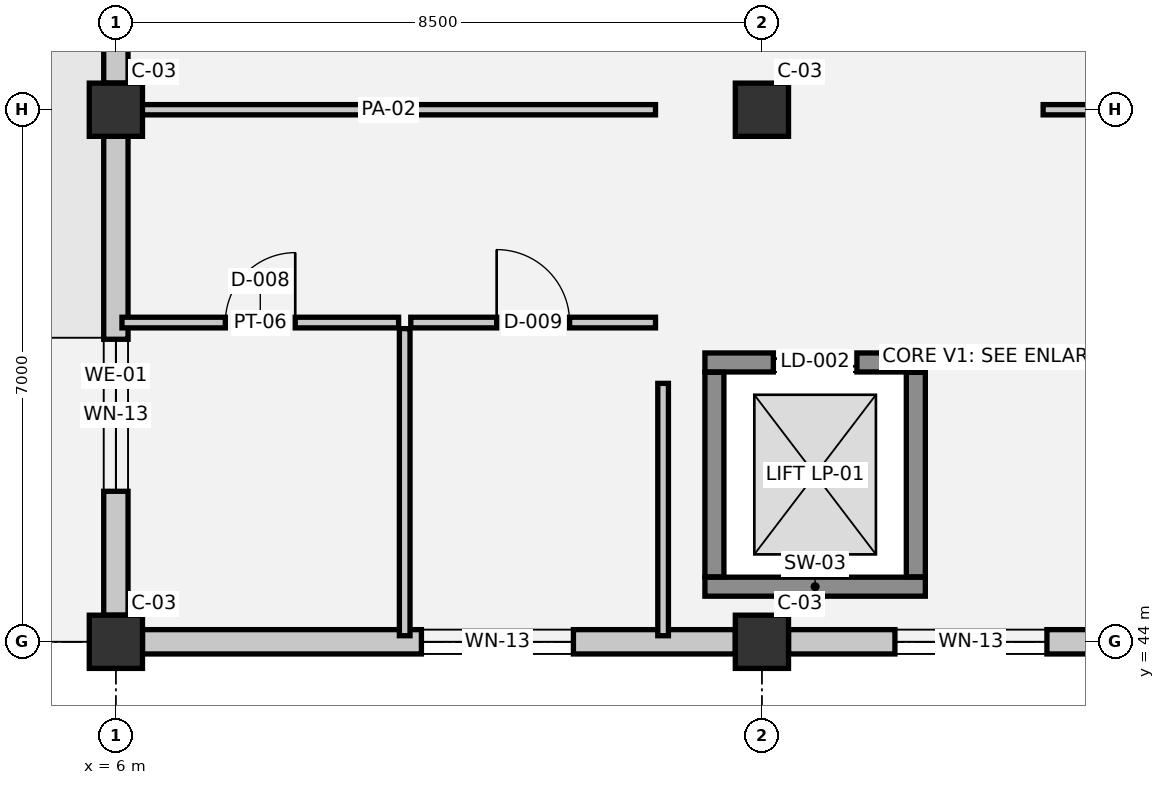
"""IFC4 building model, lengths in metres.
Left out: names, types, materials, properties, quantities, classifications, styles, units other than length and angle.
Written with IfcOpenShell. Run it as: python <this file> out.ifc"""

import sys

from ifc_helpers import new_model, si_unit, direction, frame, frame_2d, origin, origin_2d, place, context, subcontext, project, spatial, rectangle, extrude, element, fill, save


model = new_model("IFC4")
c1 = context("Model", 3, precision=1e-05, world=origin(), true_north=direction((0.0, 1.0)))
c2 = subcontext(c1, "Body", "Model", "MODEL_VIEW")
j1 = project(units=[si_unit("LENGTHUNIT", "METRE"), si_unit("PLANEANGLEUNIT", "RADIAN")], contexts=[c1])
p1 = place(None, origin())
s1 = spatial("IfcSite", under=j1, at=p1, CompositionType="ELEMENT")
p2 = place(p1, origin())
s2 = spatial("IfcBuilding", under=s1, at=p2, CompositionType="ELEMENT")
p3 = place(p2, origin())
s3 = spatial("IfcBuildingStorey", under=s2, at=p3, CompositionType="ELEMENT", Elevation=0.0)
for number, where, z_axis, x_axis in (
    (1, (6.0, 44.0, 0.0), (0.0, 0.0, 1.0), (1.0, 0.0, 0.0)),
    (2, (6.0, 51.0, 0.0), (0.0, 0.0, 1.0), (1.0, 0.0, 0.0)),
    (3, (14.5, 44.0, 0.0), (0.0, 0.0, 1.0), (1.0, 0.0, 0.0)),
    (4, (14.5, 51.0, 0.0), (0.0, 0.0, 1.0), (1.0, 0.0, 0.0)),
):
    element("IfcColumn", number, at=place(p3, frame(where, z_axis=z_axis, x_axis=x_axis)), inside=s3, PredefinedType="COLUMN", context=c2, shape_type="SweptSolid", body=[
        extrude(rectangle(XDim=0.7, YDim=0.7, at=origin_2d()), origin(), (0.0, 0.0, 1.0), 5.4),
    ])
p4 = place(p3, frame((6.0, 44.35, 0.0), z_axis=(0.0, 0.0, 1.0), x_axis=(0.0, 1.0, 0.0)))
e5 = element("IfcWall", 5, at=p4, inside=s3, PredefinedType="SOLIDWALL", context=c2, shape_type="SweptSolid", body=[
    extrude(rectangle(XDim=6.3, YDim=0.32, at=frame_2d((3.15, 0.0))), origin(), (0.0, 0.0, 1.0), 4.01),
])
p5 = place(p4, frame((1.63, 0.0, 0.9)))
e6 = element("IfcOpeningElement", 6, at=p5, cuts=e5, PredefinedType="OPENING", context=c2, shape_type="SweptSolid", body=[
    extrude(rectangle(XDim=2.0, YDim=2.2, at=frame_2d((1.0, 1.1))), frame((0.0, 0.17, 0.0), z_axis=(0.0, -1.0, 0.0), x_axis=(1.0, 0.0, 0.0)), (0.0, 0.0, 1.0), 0.34),
])
p6 = place(p3, frame((6.0, 51.35, 0.0), z_axis=(0.0, 0.0, 1.0), x_axis=(0.0, 1.0, 0.0)))
e7 = element("IfcWall", 7, at=p6, inside=s3, PredefinedType="SOLIDWALL", context=c2, shape_type="SweptSolid", body=[
    extrude(rectangle(XDim=13.3, YDim=0.32, at=frame_2d((6.65, 0.0))), origin(), (0.0, 0.0, 1.0), 4.01),
])
p7 = place(p6, frame((5.45, 0.0, 0.0)))
e8 = element("IfcOpeningElement", 8, at=p7, cuts=e7, PredefinedType="OPENING", context=c2, shape_type="SweptSolid", body=[
    extrude(rectangle(XDim=2.4, YDim=2.4, at=frame_2d((1.2, 1.2))), frame((0.0, 0.17, 0.0), z_axis=(0.0, -1.0, 0.0), x_axis=(1.0, 0.0, 0.0)), (0.0, 0.0, 1.0), 0.34),
])
p8 = place(p3, frame((19.65, 44.0, 0.0), z_axis=(0.0, 0.0, 1.0), x_axis=(-1.0, 0.0, 0.0)))
e9 = element("IfcWall", 9, at=p8, inside=s3, PredefinedType="SOLIDWALL", context=c2, shape_type="SweptSolid", body=[
    extrude(rectangle(XDim=4.8, YDim=0.32, at=frame_2d((2.4, 0.0))), origin(), (0.0, 0.0, 1.0), 4.01),
])
p9 = place(p8, frame((1.4, 0.0, 0.9)))
e10 = element("IfcOpeningElement", 10, at=p9, cuts=e9, PredefinedType="OPENING", context=c2, shape_type="SweptSolid", body=[
    extrude(rectangle(XDim=2.0, YDim=2.2, at=frame_2d((1.0, 1.1))), frame((0.0, 0.17, 0.0), z_axis=(0.0, -1.0, 0.0), x_axis=(1.0, 0.0, 0.0)), (0.0, 0.0, 1.0), 0.34),
])
p10 = place(p3, frame((14.15, 44.0, 0.0), z_axis=(0.0, 0.0, 1.0), x_axis=(-1.0, 0.0, 0.0)))
e11 = element("IfcWall", 11, at=p10, inside=s3, PredefinedType="SOLIDWALL", context=c2, shape_type="SweptSolid", body=[
    extrude(rectangle(XDim=7.8, YDim=0.32, at=frame_2d((3.9, 0.0))), origin(), (0.0, 0.0, 1.0), 4.01),
])
p11 = place(p10, frame((2.13, 0.0, 0.9)))
e12 = element("IfcOpeningElement", 12, at=p11, cuts=e11, PredefinedType="OPENING", context=c2, shape_type="SweptSolid", body=[
    extrude(rectangle(XDim=2.0, YDim=2.2, at=frame_2d((1.0, 1.1))), frame((0.0, 0.17, 0.0), z_axis=(0.0, -1.0, 0.0), x_axis=(1.0, 0.0, 0.0)), (0.0, 0.0, 1.0), 0.34),
])
p12 = place(p3, frame((13.75, 44.725, 0.0), z_axis=(0.0, 0.0, 1.0), x_axis=(1.0, 0.0, 0.0)))
e13 = element("IfcWall", 13, at=p12, inside=s3, PredefinedType="SHEAR", context=c2, shape_type="SweptSolid", body=[
    extrude(rectangle(XDim=2.9, YDim=0.25, at=frame_2d((1.45, 0.0))), origin(), (0.0, 0.0, 1.0), 5.4),
])
p13 = place(p3, frame((16.65, 47.675, 0.0), z_axis=(0.0, 0.0, 1.0), x_axis=(-1.0, 0.0, 0.0)))
e14 = element("IfcWall", 14, at=p13, inside=s3, PredefinedType="SHEAR", context=c2, shape_type="SweptSolid", body=[
    extrude(rectangle(XDim=2.9, YDim=0.25, at=frame_2d((1.45, 0.0))), origin(), (0.0, 0.0, 1.0), 5.4),
])
p14 = place(p13, frame((0.9, 0.0, 0.0)))
e15 = element("IfcOpeningElement", 15, at=p14, cuts=e14, PredefinedType="OPENING", context=c2, shape_type="SweptSolid", body=[
    extrude(rectangle(XDim=1.1, YDim=2.15, at=frame_2d((0.55, 1.075))), frame((0.0, 0.135, 0.0), z_axis=(0.0, -1.0, 0.0), x_axis=(1.0, 0.0, 0.0)), (0.0, 0.0, 1.0), 0.27),
])
for number, where, z_axis, x_axis in (
    (16, (13.875, 47.545, 0.0), (0.0, 0.0, 1.0), (0.0, -1.0, 0.0)),
    (17, (16.525, 44.855, 0.0), (0.0, 0.0, 1.0), (0.0, 1.0, 0.0)),
):
    element("IfcWall", number, at=place(p3, frame(where, z_axis=z_axis, x_axis=x_axis)), inside=s3, PredefinedType="SHEAR", context=c2, shape_type="SweptSolid", body=[
        extrude(rectangle(XDim=2.69, YDim=0.25, at=frame_2d((1.345, 0.0))), origin(), (0.0, 0.0, 1.0), 5.4),
    ])
p15 = place(p3, frame((6.08, 48.2, 0.0), z_axis=(0.0, 0.0, 1.0), x_axis=(1.0, 0.0, 0.0)))
e18 = element("IfcWall", 18, at=p15, inside=s3, PredefinedType="PLUMBINGWALL", context=c2, shape_type="SweptSolid", body=[
    extrude(rectangle(XDim=3.64, YDim=0.14, at=frame_2d((1.82, 0.0))), origin(), (0.0, 0.0, 1.0), 5.04),
])
p16 = place(p15, frame((1.36, 0.0, 0.0)))
e19 = element("IfcOpeningElement", 19, at=p16, cuts=e18, PredefinedType="OPENING", context=c2, shape_type="SweptSolid", body=[
    extrude(rectangle(XDim=0.92, YDim=2.1, at=frame_2d((0.46, 1.05))), frame((0.0, 0.08, 0.0), z_axis=(0.0, -1.0, 0.0), x_axis=(1.0, 0.0, 0.0)), (0.0, 0.0, 1.0), 0.16),
])
p17 = place(p3, frame((9.88, 48.2, 0.0), z_axis=(0.0, 0.0, 1.0), x_axis=(1.0, 0.0, 0.0)))
e20 = element("IfcWall", 20, at=p17, inside=s3, PredefinedType="PLUMBINGWALL", context=c2, shape_type="SweptSolid", body=[
    extrude(rectangle(XDim=3.22, YDim=0.14, at=frame_2d((1.61, 0.0))), origin(), (0.0, 0.0, 1.0), 5.04),
])
p18 = place(p17, frame((1.13, 0.0, 0.0)))
e21 = element("IfcOpeningElement", 21, at=p18, cuts=e20, PredefinedType="OPENING", context=c2, shape_type="SweptSolid", body=[
    extrude(rectangle(XDim=0.96, YDim=2.1, at=frame_2d((0.48, 1.05))), frame((0.0, 0.08, 0.0), z_axis=(0.0, -1.0, 0.0), x_axis=(1.0, 0.0, 0.0)), (0.0, 0.0, 1.0), 0.16),
])
p19 = place(p3, frame((6.08, 51.0, 0.0), z_axis=(0.0, 0.0, 1.0), x_axis=(1.0, 0.0, 0.0)))
e22 = element("IfcWall", 22, at=p19, inside=s3, PredefinedType="PARTITIONING", context=c2, shape_type="SweptSolid", body=[
    extrude(rectangle(XDim=7.02, YDim=0.135, at=frame_2d((3.51, 0.0))), origin(), (0.0, 0.0, 1.0), 4.43),
])
p20 = place(p3, frame((18.2, 51.0, 0.0), z_axis=(0.0, 0.0, 1.0), x_axis=(1.0, 0.0, 0.0)))
e23 = element("IfcWall", 23, at=p20, inside=s3, PredefinedType="PARTITIONING", context=c2, shape_type="SweptSolid", body=[
    extrude(rectangle(XDim=1.45, YDim=0.135, at=frame_2d((0.725, 0.0))), origin(), (0.0, 0.0, 1.0), 4.43),
])
p21 = place(p3, frame((9.8, 44.08, 0.0), z_axis=(0.0, 0.0, 1.0), x_axis=(0.0, 1.0, 0.0)))
e24 = element("IfcWall", 24, at=p21, inside=s3, PredefinedType="PLUMBINGWALL", context=c2, shape_type="SweptSolid", body=[
    extrude(rectangle(XDim=4.04, YDim=0.14, at=frame_2d((2.02, 0.0))), origin(), (0.0, 0.0, 1.0), 5.04),
])
p22 = place(p3, frame((13.2, 44.08, 0.0), z_axis=(0.0, 0.0, 1.0), x_axis=(0.0, 1.0, 0.0)))
e25 = element("IfcWall", 25, at=p22, inside=s3, PredefinedType="PLUMBINGWALL", context=c2, shape_type="SweptSolid", body=[
    extrude(rectangle(XDim=3.32, YDim=0.14, at=frame_2d((1.66, 0.0))), origin(), (0.0, 0.0, 1.0), 5.04),
])
p23 = place(p5, origin())
e26 = element("IfcWindow", 26, at=p23, inside=s3, PartitioningType="SINGLE_PANEL", PredefinedType="WINDOW", context=c2, shape_type="SweptSolid", body=[
    extrude(rectangle(XDim=2.0, YDim=2.2, at=frame_2d((1.0, 1.1))), frame((0.0, 0.03, 0.0), z_axis=(0.0, -1.0, 0.0), x_axis=(1.0, 0.0, 0.0)), (0.0, 0.0, 1.0), 0.06),
])
fill(e6, e26)
p24 = place(p9, origin())
e27 = element("IfcWindow", 27, at=p24, inside=s3, PartitioningType="SINGLE_PANEL", PredefinedType="WINDOW", context=c2, shape_type="SweptSolid", body=[
    extrude(rectangle(XDim=2.0, YDim=2.2, at=frame_2d((1.0, 1.1))), frame((0.0, 0.03, 0.0), z_axis=(0.0, -1.0, 0.0), x_axis=(1.0, 0.0, 0.0)), (0.0, 0.0, 1.0), 0.06),
])
fill(e10, e27)
p25 = place(p11, origin())
e28 = element("IfcWindow", 28, at=p25, inside=s3, PartitioningType="SINGLE_PANEL", PredefinedType="WINDOW", context=c2, shape_type="SweptSolid", body=[
    extrude(rectangle(XDim=2.0, YDim=2.2, at=frame_2d((1.0, 1.1))), frame((0.0, 0.03, 0.0), z_axis=(0.0, -1.0, 0.0), x_axis=(1.0, 0.0, 0.0)), (0.0, 0.0, 1.0), 0.06),
])
fill(e12, e28)
p26 = place(p14, origin())
e29 = element("IfcDoor", 29, at=p26, inside=s3, OperationType="DOUBLE_DOOR_SLIDING", PredefinedType="DOOR", context=c2, shape_type="SweptSolid", body=[
    extrude(rectangle(XDim=1.1, YDim=2.15, at=frame_2d((0.55, 1.075))), frame((0.0, 0.025, 0.0), z_axis=(0.0, -1.0, 0.0), x_axis=(1.0, 0.0, 0.0)), (0.0, 0.0, 1.0), 0.05),
])
fill(e15, e29)
p27 = place(p16, origin())
e30 = element("IfcDoor", 30, at=p27, inside=s3, OperationType="SINGLE_SWING_RIGHT", PredefinedType="DOOR", context=c2, shape_type="SweptSolid", body=[
    extrude(rectangle(XDim=0.92, YDim=2.1, at=frame_2d((0.46, 1.05))), frame((0.0, 0.025, 0.0), z_axis=(0.0, -1.0, 0.0), x_axis=(1.0, 0.0, 0.0)), (0.0, 0.0, 1.0), 0.05),
])
fill(e19, e30)
p28 = place(p18, origin())
e31 = element("IfcDoor", 31, at=p28, inside=s3, OperationType="SINGLE_SWING_LEFT", PredefinedType="DOOR", context=c2, shape_type="SweptSolid", body=[
    extrude(rectangle(XDim=0.96, YDim=2.1, at=frame_2d((0.48, 1.05))), frame((0.0, 0.025, 0.0), z_axis=(0.0, -1.0, 0.0), x_axis=(1.0, 0.0, 0.0)), (0.0, 0.0, 1.0), 0.05),
])
fill(e21, e31)
save(model, sys.argv[1])
